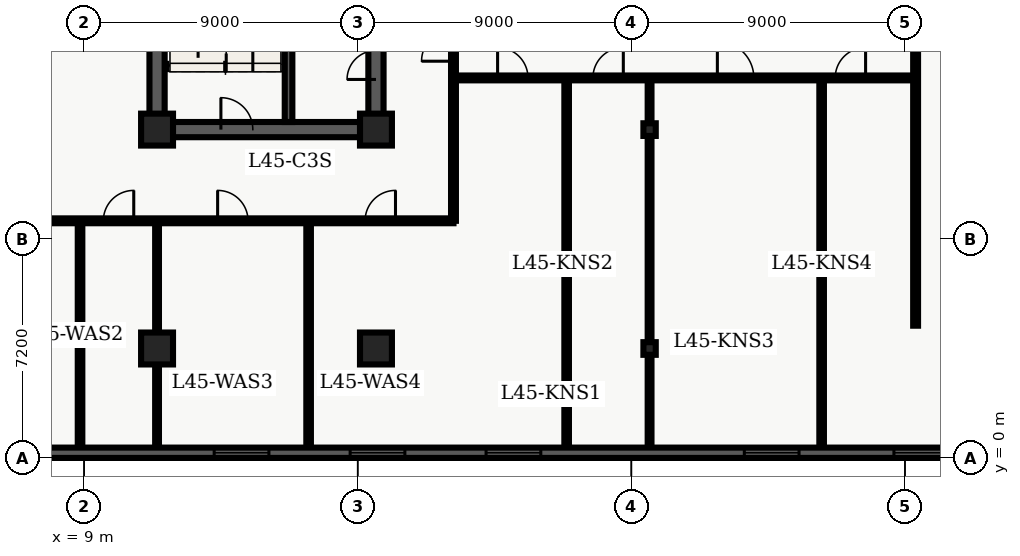
"""IFC4 building model, lengths in metres.
Left out: names, types, materials, properties, quantities, classifications, styles, units other than length and angle.
Written with IfcOpenShell. Run it as: python <this file> out.ifc"""

import sys

from ifc_helpers import new_model, entity, si_unit, converted_unit, direction, frame, origin_with_axes, origin_2d_with_axis, place, context, subcontext, project, spatial, polyline, rectangle, i_section, outline, extrude, element, fill, save


model = new_model("IFC4")
c1 = context("Model", 3, precision=1e-05, world=origin_with_axes(), true_north=direction((0.0, 1.0)))
c2 = subcontext(c1, "Body", "Model", "MODEL_VIEW")
j1 = project(units=[si_unit("LENGTHUNIT", "METRE"), converted_unit("PLANEANGLEUNIT", "DEGREE", entity("IfcPlaneAngleMeasure", 0.017), si_unit("PLANEANGLEUNIT", "RADIAN"), dimensions=[0, 0, 0, 0, 0, 0, 0])], contexts=[c1])
p1 = place(None, origin_with_axes())
s1 = spatial("IfcSite", under=j1, at=p1, CompositionType="ELEMENT")
p2 = place(p1, origin_with_axes())
s2 = spatial("IfcBuilding", under=s1, at=p2, CompositionType="ELEMENT")
p3 = place(p2, frame((0.0, 0.0, 183.6), z_axis=(0.0, 0.0, 1.0), x_axis=(1.0, 0.0, 0.0)))
s3 = spatial("IfcBuildingStorey", under=s2, at=p3, CompositionType="ELEMENT", Elevation=183.6)
p4 = place(p3, frame((11.4, 10.8, 0.0), z_axis=(0.0, 0.0, 1.0), x_axis=(0.0, 1.0, 0.0)))
e1 = element("IfcWall", 1, at=p4, inside=s3, PredefinedType="SHEAR", context=c2, shape_type="SweptSolid", body=[
    extrude(outline(polyline([(0.0, -0.25), (27.0, -0.25), (27.0, 0.25), (0.0, 0.25), (0.0, -0.25)])), origin_with_axes(), (0.0, 0.0, 1.0), 3.6),
])
p5 = place(p3, frame((11.4, 10.8, 0.0), z_axis=(0.0, 0.0, 1.0), x_axis=(1.0, 0.0, 0.0)))
e2 = element("IfcWall", 2, at=p5, inside=s3, PredefinedType="SHEAR", context=c2, shape_type="SweptSolid", body=[
    extrude(outline(polyline([(0.0, -0.25), (7.2, -0.25), (7.2, 0.25), (0.0, 0.25), (0.0, -0.25)])), origin_with_axes(), (0.0, 0.0, 1.0), 3.6),
])
p6 = place(p5, frame((2.625, 0.0, 0.0), z_axis=(0.0, 0.0, 1.0), x_axis=(1.0, 0.0, 0.0)))
e3 = element("IfcOpeningElement", 3, at=p6, cuts=e2, PredefinedType="OPENING", context=c2, shape_type="SweptSolid", body=[
    extrude(rectangle(XDim=1.05, YDim=0.52, at=origin_2d_with_axis()), origin_with_axes(), (0.0, 0.0, 1.0), 2.15),
])
p7 = place(p3, frame((18.6, 10.8, 0.0), z_axis=(0.0, 0.0, 1.0), x_axis=(0.0, 1.0, 0.0)))
e4 = element("IfcWall", 4, at=p7, inside=s3, PredefinedType="SHEAR", context=c2, shape_type="SweptSolid", body=[
    extrude(outline(polyline([(0.0, -0.25), (13.5, -0.25), (13.5, 0.25), (0.0, 0.25), (0.0, -0.25)])), origin_with_axes(), (0.0, 0.0, 1.0), 3.6),
])
p8 = place(p7, frame((11.125, 0.0, 0.0), z_axis=(0.0, 0.0, 1.0), x_axis=(1.0, 0.0, 0.0)))
e5 = element("IfcOpeningElement", 5, at=p8, cuts=e4, PredefinedType="OPENING", context=c2, shape_type="SweptSolid", body=[
    extrude(rectangle(XDim=1.05, YDim=0.52, at=origin_2d_with_axis()), origin_with_axes(), (0.0, 0.0, 1.0), 2.15),
])
p9 = place(p7, frame((2.125, 0.0, 0.0), z_axis=(0.0, 0.0, 1.0), x_axis=(1.0, 0.0, 0.0)))
e6 = element("IfcOpeningElement", 6, at=p9, cuts=e4, PredefinedType="OPENING", context=c2, shape_type="SweptSolid", body=[
    extrude(rectangle(XDim=0.95, YDim=0.52, at=origin_2d_with_axis()), origin_with_axes(), (0.0, 0.0, 1.0), 2.15),
])
p10 = place(p7, frame((6.275, 0.0, 0.0), z_axis=(0.0, 0.0, 1.0), x_axis=(1.0, 0.0, 0.0)))
e7 = element("IfcOpeningElement", 7, at=p10, cuts=e4, PredefinedType="OPENING", context=c2, shape_type="SweptSolid", body=[
    extrude(rectangle(XDim=0.95, YDim=0.52, at=origin_2d_with_axis()), origin_with_axes(), (0.0, 0.0, 1.0), 2.15),
])
p11 = place(p3, frame((15.725, 11.05, 0.0), z_axis=(0.0, 0.0, 1.0), x_axis=(0.0, 1.0, 0.0)))
e8 = element("IfcWall", 8, at=p11, inside=s3, PredefinedType="SHEAR", context=c2, shape_type="SweptSolid", body=[
    extrude(outline(polyline([(0.0, -0.125), (8.65, -0.125), (8.65, 0.125), (0.0, 0.125), (0.0, -0.125)])), origin_with_axes(), (0.0, 0.0, 1.0), 3.6),
])
for number, where, z_axis, x_axis in (
    (9, (11.4, 3.6, 0.0), (0.0, 0.0, 1.0), (1.0, 0.0, 0.0)),
    (10, (11.4, 10.8, 0.0), (0.0, 0.0, 1.0), (1.0, 0.0, 0.0)),
    (11, (18.6, 3.6, 0.0), (0.0, 0.0, 1.0), (1.0, 0.0, 0.0)),
    (12, (18.6, 10.8, 0.0), (0.0, 0.0, 1.0), (1.0, 0.0, 0.0)),
):
    element("IfcColumn", number, at=place(p3, frame(where, z_axis=z_axis, x_axis=x_axis)), inside=s3, PredefinedType="COLUMN", context=c2, shape_type="SweptSolid", body=[
        extrude(rectangle(XDim=1.05, YDim=1.05, at=origin_2d_with_axis()), origin_with_axes(), (0.0, 0.0, 1.0), 3.9),
    ])
for number, where, z_axis, x_axis in (
    (13, (27.6, 3.6, 0.0), (0.0, 0.0, 1.0), (1.0, 0.0, 0.0)),
    (14, (27.6, 10.8, 0.0), (0.0, 0.0, 1.0), (1.0, 0.0, 0.0)),
):
    element("IfcColumn", number, at=place(p3, frame(where, z_axis=z_axis, x_axis=x_axis)), inside=s3, PredefinedType="COLUMN", context=c2, shape_type="SweptSolid", body=[
        extrude(i_section(OverallWidth=0.406, OverallDepth=0.416, WebThickness=0.03, FlangeThickness=0.048, FilletRadius=0.022, at=origin_2d_with_axis()), origin_with_axes(), (0.0, 0.0, 1.0), 3.9),
    ])
p12 = place(p3, frame((2.6, 7.8, 0.0), z_axis=(0.0, 0.0, 1.0), x_axis=(1.0, 0.0, 0.0)))
e15 = element("IfcWall", 15, at=p12, inside=s3, PredefinedType="PARTITIONING", context=c2, shape_type="SweptSolid", body=[
    extrude(outline(polyline([(0.0, -0.08), (18.55, -0.08), (18.55, 0.08), (0.0, 0.08), (0.0, -0.08)])), origin_with_axes(), (0.0, 0.0, 1.0), 2.64),
])
p13 = place(p12, frame((2.569, 0.0, 0.0), z_axis=(0.0, 0.0, 1.0), x_axis=(1.0, 0.0, 0.0)))
e16 = element("IfcOpeningElement", 16, at=p13, cuts=e15, PredefinedType="OPENING", context=c2, shape_type="SweptSolid", body=[
    extrude(rectangle(XDim=1.0, YDim=0.18, at=origin_2d_with_axis()), origin_with_axes(), (0.0, 0.0, 1.0), 2.15),
])
p14 = place(p12, frame((7.534, 0.0, 0.0), z_axis=(0.0, 0.0, 1.0), x_axis=(1.0, 0.0, 0.0)))
e17 = element("IfcOpeningElement", 17, at=p14, cuts=e15, PredefinedType="OPENING", context=c2, shape_type="SweptSolid", body=[
    extrude(rectangle(XDim=1.0, YDim=0.18, at=origin_2d_with_axis()), origin_with_axes(), (0.0, 0.0, 1.0), 2.15),
])
p15 = place(p12, frame((11.293, 0.0, 0.0), z_axis=(0.0, 0.0, 1.0), x_axis=(1.0, 0.0, 0.0)))
e18 = element("IfcOpeningElement", 18, at=p15, cuts=e15, PredefinedType="OPENING", context=c2, shape_type="SweptSolid", body=[
    extrude(rectangle(XDim=1.0, YDim=0.18, at=origin_2d_with_axis()), origin_with_axes(), (0.0, 0.0, 1.0), 2.15),
])
p16 = place(p12, frame((16.142, 0.0, 0.0), z_axis=(0.0, 0.0, 1.0), x_axis=(1.0, 0.0, 0.0)))
e19 = element("IfcOpeningElement", 19, at=p16, cuts=e15, PredefinedType="OPENING", context=c2, shape_type="SweptSolid", body=[
    extrude(rectangle(XDim=1.0, YDim=0.18, at=origin_2d_with_axis()), origin_with_axes(), (0.0, 0.0, 1.0), 2.15),
])
p17 = place(p3, frame((21.15, 7.8, 0.0), z_axis=(0.0, 0.0, 1.0), x_axis=(0.0, 1.0, 0.0)))
e20 = element("IfcWall", 20, at=p17, inside=s3, PredefinedType="PARTITIONING", context=c2, shape_type="SweptSolid", body=[
    extrude(outline(polyline([(0.0, -0.08), (32.7, -0.08), (32.7, 0.08), (0.0, 0.08), (0.0, -0.08)])), origin_with_axes(), (0.0, 0.0, 1.0), 2.64),
])
p18 = place(p17, frame((16.456, 0.0, 0.0), z_axis=(0.0, 0.0, 1.0), x_axis=(1.0, 0.0, 0.0)))
e21 = element("IfcOpeningElement", 21, at=p18, cuts=e20, PredefinedType="OPENING", context=c2, shape_type="SweptSolid", body=[
    extrude(rectangle(XDim=1.0, YDim=0.18, at=origin_2d_with_axis()), origin_with_axes(), (0.0, 0.0, 1.0), 2.15),
])
p19 = place(p17, frame((22.009, 0.0, 0.0), z_axis=(0.0, 0.0, 1.0), x_axis=(1.0, 0.0, 0.0)))
e22 = element("IfcOpeningElement", 22, at=p19, cuts=e20, PredefinedType="OPENING", context=c2, shape_type="SweptSolid", body=[
    extrude(rectangle(XDim=1.0, YDim=0.18, at=origin_2d_with_axis()), origin_with_axes(), (0.0, 0.0, 1.0), 2.15),
])
p20 = place(p17, frame((28.803, 0.0, 0.0), z_axis=(0.0, 0.0, 1.0), x_axis=(1.0, 0.0, 0.0)))
e23 = element("IfcOpeningElement", 23, at=p20, cuts=e20, PredefinedType="OPENING", context=c2, shape_type="SweptSolid", body=[
    extrude(rectangle(XDim=1.0, YDim=0.18, at=origin_2d_with_axis()), origin_with_axes(), (0.0, 0.0, 1.0), 2.15),
])
p21 = place(p17, frame((5.775, 0.0, 0.0), z_axis=(0.0, 0.0, 1.0), x_axis=(1.0, 0.0, 0.0)))
e24 = element("IfcOpeningElement", 24, at=p21, cuts=e20, PredefinedType="OPENING", context=c2, shape_type="SweptSolid", body=[
    extrude(rectangle(XDim=1.05, YDim=0.18, at=origin_2d_with_axis()), origin_with_axes(), (0.0, 0.0, 1.0), 2.15),
])
p22 = place(p3, frame((8.867, 0.335, 0.0), z_axis=(0.0, 0.0, 1.0), x_axis=(0.0, 1.0, 0.0)))
e25 = element("IfcWall", 25, at=p22, inside=s3, PredefinedType="PARTITIONING", context=c2, shape_type="SweptSolid", body=[
    extrude(outline(polyline([(0.0, -0.075), (7.365, -0.075), (7.365, 0.075), (0.0, 0.075), (0.0, -0.075)])), origin_with_axes(), (0.0, 0.0, 1.0), 2.64),
])
p23 = place(p3, frame((11.4, 0.335, 0.0), z_axis=(0.0, 0.0, 1.0), x_axis=(0.0, 1.0, 0.0)))
e26 = element("IfcWall", 26, at=p23, inside=s3, PredefinedType="PARTITIONING", context=c2, shape_type="SweptSolid", body=[
    extrude(outline(polyline([(0.0, -0.062), (7.365, -0.062), (7.365, 0.062), (0.0, 0.062), (0.0, -0.062)])), origin_with_axes(), (0.0, 0.0, 1.0), 2.64),
])
p24 = place(p3, frame((16.385, 0.335, 0.0), z_axis=(0.0, 0.0, 1.0), x_axis=(0.0, 1.0, 0.0)))
e27 = element("IfcWall", 27, at=p24, inside=s3, PredefinedType="PARTITIONING", context=c2, shape_type="SweptSolid", body=[
    extrude(outline(polyline([(0.0, -0.075), (7.365, -0.075), (7.365, 0.075), (0.0, 0.075), (0.0, -0.075)])), origin_with_axes(), (0.0, 0.0, 1.0), 2.64),
])
p25 = place(p3, frame((21.15, 12.5, 0.0), z_axis=(0.0, 0.0, 1.0), x_axis=(1.0, 0.0, 0.0)))
e28 = element("IfcWall", 28, at=p25, inside=s3, PredefinedType="PARTITIONING", context=c2, shape_type="SweptSolid", body=[
    extrude(outline(polyline([(0.0, -0.08), (15.2, -0.08), (15.2, 0.08), (0.0, 0.08), (0.0, -0.08)])), origin_with_axes(), (0.0, 0.0, 1.0), 2.64),
])
p26 = place(p25, frame((1.951, 0.0, 0.0), z_axis=(0.0, 0.0, 1.0), x_axis=(1.0, 0.0, 0.0)))
e29 = element("IfcOpeningElement", 29, at=p26, cuts=e28, PredefinedType="OPENING", context=c2, shape_type="SweptSolid", body=[
    extrude(rectangle(XDim=1.0, YDim=0.18, at=origin_2d_with_axis()), origin_with_axes(), (0.0, 0.0, 1.0), 2.15),
])
p27 = place(p25, frame((5.086, 0.0, 0.0), z_axis=(0.0, 0.0, 1.0), x_axis=(1.0, 0.0, 0.0)))
e30 = element("IfcOpeningElement", 30, at=p27, cuts=e28, PredefinedType="OPENING", context=c2, shape_type="SweptSolid", body=[
    extrude(rectangle(XDim=1.0, YDim=0.18, at=origin_2d_with_axis()), origin_with_axes(), (0.0, 0.0, 1.0), 2.15),
])
p28 = place(p25, frame((9.28, 0.0, 0.0), z_axis=(0.0, 0.0, 1.0), x_axis=(1.0, 0.0, 0.0)))
e31 = element("IfcOpeningElement", 31, at=p28, cuts=e28, PredefinedType="OPENING", context=c2, shape_type="SweptSolid", body=[
    extrude(rectangle(XDim=1.2, YDim=0.18, at=origin_2d_with_axis()), origin_with_axes(), (0.0, 0.0, 1.0), 2.2),
])
p29 = place(p25, frame((13.055, 0.0, 0.0), z_axis=(0.0, 0.0, 1.0), x_axis=(1.0, 0.0, 0.0)))
e32 = element("IfcOpeningElement", 32, at=p29, cuts=e28, PredefinedType="OPENING", context=c2, shape_type="SweptSolid", body=[
    extrude(rectangle(XDim=1.0, YDim=0.18, at=origin_2d_with_axis()), origin_with_axes(), (0.0, 0.0, 1.0), 2.15),
])
p30 = place(p3, frame((36.35, 4.35, 0.0), z_axis=(0.0, 0.0, 1.0), x_axis=(0.0, 1.0, 0.0)))
e33 = element("IfcWall", 33, at=p30, inside=s3, PredefinedType="PARTITIONING", context=c2, shape_type="SweptSolid", body=[
    extrude(outline(polyline([(0.0, -0.08), (16.95, -0.08), (16.95, 0.08), (0.0, 0.08), (0.0, -0.08)])), origin_with_axes(), (0.0, 0.0, 1.0), 2.64),
])
p31 = place(p3, frame((24.872, 0.335, 0.0), z_axis=(0.0, 0.0, 1.0), x_axis=(0.0, 1.0, 0.0)))
e34 = element("IfcWall", 34, at=p31, inside=s3, PredefinedType="PARTITIONING", context=c2, shape_type="SweptSolid", body=[
    extrude(outline(polyline([(0.0, -0.075), (12.045, -0.075), (12.045, 0.075), (0.0, 0.075), (0.0, -0.075)])), origin_with_axes(), (0.0, 0.0, 1.0), 2.64),
])
p32 = place(p3, frame((27.6, 0.335, 0.0), z_axis=(0.0, 0.0, 1.0), x_axis=(0.0, 1.0, 0.0)))
e35 = element("IfcWall", 35, at=p32, inside=s3, PredefinedType="PARTITIONING", context=c2, shape_type="SweptSolid", body=[
    extrude(outline(polyline([(0.0, -0.062), (12.045, -0.062), (12.045, 0.062), (0.0, 0.062), (0.0, -0.062)])), origin_with_axes(), (0.0, 0.0, 1.0), 2.64),
])
p33 = place(p3, frame((33.259, 0.335, 0.0), z_axis=(0.0, 0.0, 1.0), x_axis=(0.0, 1.0, 0.0)))
e36 = element("IfcWall", 36, at=p33, inside=s3, PredefinedType="PARTITIONING", context=c2, shape_type="SweptSolid", body=[
    extrude(outline(polyline([(0.0, -0.075), (12.045, -0.075), (12.045, 0.075), (0.0, 0.075), (0.0, -0.075)])), origin_with_axes(), (0.0, 0.0, 1.0), 2.64),
])
p34 = place(p3, frame((57.26, 0.17, 0.0), z_axis=(0.0, 0.0, 1.0), x_axis=(-1.0, 0.0, 0.0)))
e37 = element("IfcWall", 37, at=p34, inside=s3, PredefinedType="SOLIDWALL", context=c2, shape_type="SweptSolid", body=[
    extrude(outline(polyline([(0.0, -0.17), (54.86, -0.17), (54.86, 0.17), (0.0, 0.17), (0.0, -0.17)])), origin_with_axes(), (0.0, 0.0, 1.0), 3.6),
])
p35 = place(p34, frame((2.836, 0.0, 0.45), z_axis=(0.0, 0.0, 1.0), x_axis=(1.0, 0.0, 0.0)))
e38 = element("IfcOpeningElement", 38, at=p35, cuts=e37, PredefinedType="OPENING", context=c2, shape_type="SweptSolid", body=[
    extrude(rectangle(XDim=1.8, YDim=0.36, at=origin_2d_with_axis()), origin_with_axes(), (0.0, 0.0, 1.0), 2.1),
])
p36 = place(p34, frame((7.307, 0.0, 0.45), z_axis=(0.0, 0.0, 1.0), x_axis=(1.0, 0.0, 0.0)))
e39 = element("IfcOpeningElement", 39, at=p36, cuts=e37, PredefinedType="OPENING", context=c2, shape_type="SweptSolid", body=[
    extrude(rectangle(XDim=1.8, YDim=0.36, at=origin_2d_with_axis()), origin_with_axes(), (0.0, 0.0, 1.0), 2.1),
])
p37 = place(p34, frame((11.779, 0.0, 0.45), z_axis=(0.0, 0.0, 1.0), x_axis=(1.0, 0.0, 0.0)))
e40 = element("IfcOpeningElement", 40, at=p37, cuts=e37, PredefinedType="OPENING", context=c2, shape_type="SweptSolid", body=[
    extrude(rectangle(XDim=1.8, YDim=0.36, at=origin_2d_with_axis()), origin_with_axes(), (0.0, 0.0, 1.0), 2.1),
])
p38 = place(p34, frame((16.251, 0.0, 0.45), z_axis=(0.0, 0.0, 1.0), x_axis=(1.0, 0.0, 0.0)))
e41 = element("IfcOpeningElement", 41, at=p38, cuts=e37, PredefinedType="OPENING", context=c2, shape_type="SweptSolid", body=[
    extrude(rectangle(XDim=1.8, YDim=0.36, at=origin_2d_with_axis()), origin_with_axes(), (0.0, 0.0, 1.0), 2.1),
])
p39 = place(p34, frame((20.723, 0.0, 0.45), z_axis=(0.0, 0.0, 1.0), x_axis=(1.0, 0.0, 0.0)))
e42 = element("IfcOpeningElement", 42, at=p39, cuts=e37, PredefinedType="OPENING", context=c2, shape_type="SweptSolid", body=[
    extrude(rectangle(XDim=1.8, YDim=0.36, at=origin_2d_with_axis()), origin_with_axes(), (0.0, 0.0, 1.0), 2.1),
])
p40 = place(p34, frame((25.644, 0.0, 0.45), z_axis=(0.0, 0.0, 1.0), x_axis=(1.0, 0.0, 0.0)))
e43 = element("IfcOpeningElement", 43, at=p40, cuts=e37, PredefinedType="OPENING", context=c2, shape_type="SweptSolid", body=[
    extrude(rectangle(XDim=1.8, YDim=0.36, at=origin_2d_with_axis()), origin_with_axes(), (0.0, 0.0, 1.0), 2.1),
])
p41 = place(p34, frame((34.138, 0.0, 0.45), z_axis=(0.0, 0.0, 1.0), x_axis=(1.0, 0.0, 0.0)))
e44 = element("IfcOpeningElement", 44, at=p41, cuts=e37, PredefinedType="OPENING", context=c2, shape_type="SweptSolid", body=[
    extrude(rectangle(XDim=1.8, YDim=0.36, at=origin_2d_with_axis()), origin_with_axes(), (0.0, 0.0, 1.0), 2.1),
])
p42 = place(p34, frame((38.609, 0.0, 0.45), z_axis=(0.0, 0.0, 1.0), x_axis=(1.0, 0.0, 0.0)))
e45 = element("IfcOpeningElement", 45, at=p42, cuts=e37, PredefinedType="OPENING", context=c2, shape_type="SweptSolid", body=[
    extrude(rectangle(XDim=1.8, YDim=0.36, at=origin_2d_with_axis()), origin_with_axes(), (0.0, 0.0, 1.0), 2.1),
])
p43 = place(p34, frame((43.081, 0.0, 0.45), z_axis=(0.0, 0.0, 1.0), x_axis=(1.0, 0.0, 0.0)))
e46 = element("IfcOpeningElement", 46, at=p43, cuts=e37, PredefinedType="OPENING", context=c2, shape_type="SweptSolid", body=[
    extrude(rectangle(XDim=1.8, YDim=0.36, at=origin_2d_with_axis()), origin_with_axes(), (0.0, 0.0, 1.0), 2.1),
])
p44 = place(p34, frame((52.024, 0.0, 0.45), z_axis=(0.0, 0.0, 1.0), x_axis=(1.0, 0.0, 0.0)))
e47 = element("IfcOpeningElement", 47, at=p44, cuts=e37, PredefinedType="OPENING", context=c2, shape_type="SweptSolid", body=[
    extrude(rectangle(XDim=1.8, YDim=0.36, at=origin_2d_with_axis()), origin_with_axes(), (0.0, 0.0, 1.0), 2.1),
])
p45 = place(p5, frame((2.625, 0.0, 0.0), z_axis=(0.0, 0.0, 1.0), x_axis=(1.0, 0.0, 0.0)))
e48 = element("IfcDoor", 48, at=p45, inside=s3, OperationType="SINGLE_SWING_LEFT", PredefinedType="DOOR", context=c2, shape_type="SweptSolid", body=[
    extrude(rectangle(XDim=1.05, YDim=0.09, at=origin_2d_with_axis()), origin_with_axes(), (0.0, 0.0, 1.0), 2.15),
])
fill(e3, e48)
p46 = place(p7, frame((2.125, 0.0, 0.0), z_axis=(0.0, 0.0, 1.0), x_axis=(1.0, 0.0, 0.0)))
e49 = element("IfcDoor", 49, at=p46, inside=s3, OperationType="SINGLE_SWING_LEFT", PredefinedType="DOOR", context=c2, shape_type="SweptSolid", body=[
    extrude(rectangle(XDim=0.95, YDim=0.09, at=origin_2d_with_axis()), origin_with_axes(), (0.0, 0.0, 1.0), 2.15),
])
fill(e6, e49)
p47 = place(p12, frame((7.534, 0.0, 0.0), z_axis=(0.0, 0.0, 1.0), x_axis=(1.0, 0.0, 0.0)))
e50 = element("IfcDoor", 50, at=p47, inside=s3, OperationType="SINGLE_SWING_RIGHT", PredefinedType="DOOR", context=c2, shape_type="SweptSolid", body=[
    extrude(rectangle(XDim=1.0, YDim=0.09, at=origin_2d_with_axis()), origin_with_axes(), (0.0, 0.0, 1.0), 2.15),
])
fill(e17, e50)
p48 = place(p12, frame((11.293, 0.0, 0.0), z_axis=(0.0, 0.0, 1.0), x_axis=(1.0, 0.0, 0.0)))
e51 = element("IfcDoor", 51, at=p48, inside=s3, OperationType="SINGLE_SWING_LEFT", PredefinedType="DOOR", context=c2, shape_type="SweptSolid", body=[
    extrude(rectangle(XDim=1.0, YDim=0.09, at=origin_2d_with_axis()), origin_with_axes(), (0.0, 0.0, 1.0), 2.15),
])
fill(e18, e51)
p49 = place(p12, frame((16.142, 0.0, 0.0), z_axis=(0.0, 0.0, 1.0), x_axis=(1.0, 0.0, 0.0)))
e52 = element("IfcDoor", 52, at=p49, inside=s3, OperationType="SINGLE_SWING_RIGHT", PredefinedType="DOOR", context=c2, shape_type="SweptSolid", body=[
    extrude(rectangle(XDim=1.0, YDim=0.09, at=origin_2d_with_axis()), origin_with_axes(), (0.0, 0.0, 1.0), 2.15),
])
fill(e19, e52)
p50 = place(p17, frame((5.775, 0.0, 0.0), z_axis=(0.0, 0.0, 1.0), x_axis=(1.0, 0.0, 0.0)))
e53 = element("IfcDoor", 53, at=p50, inside=s3, OperationType="SINGLE_SWING_LEFT", PredefinedType="DOOR", context=c2, shape_type="SweptSolid", body=[
    extrude(rectangle(XDim=1.05, YDim=0.09, at=origin_2d_with_axis()), origin_with_axes(), (0.0, 0.0, 1.0), 2.15),
])
fill(e24, e53)
p51 = place(p25, frame((1.951, 0.0, 0.0), z_axis=(0.0, 0.0, 1.0), x_axis=(1.0, 0.0, 0.0)))
e54 = element("IfcDoor", 54, at=p51, inside=s3, OperationType="SINGLE_SWING_LEFT", PredefinedType="DOOR", context=c2, shape_type="SweptSolid", body=[
    extrude(rectangle(XDim=1.0, YDim=0.09, at=origin_2d_with_axis()), origin_with_axes(), (0.0, 0.0, 1.0), 2.15),
])
fill(e29, e54)
p52 = place(p25, frame((5.086, 0.0, 0.0), z_axis=(0.0, 0.0, 1.0), x_axis=(1.0, 0.0, 0.0)))
e55 = element("IfcDoor", 55, at=p52, inside=s3, OperationType="SINGLE_SWING_RIGHT", PredefinedType="DOOR", context=c2, shape_type="SweptSolid", body=[
    extrude(rectangle(XDim=1.0, YDim=0.09, at=origin_2d_with_axis()), origin_with_axes(), (0.0, 0.0, 1.0), 2.15),
])
fill(e30, e55)
p53 = place(p25, frame((9.28, 0.0, 0.0), z_axis=(0.0, 0.0, 1.0), x_axis=(1.0, 0.0, 0.0)))
e56 = element("IfcDoor", 56, at=p53, inside=s3, OperationType="SINGLE_SWING_LEFT", PredefinedType="DOOR", context=c2, shape_type="SweptSolid", body=[
    extrude(rectangle(XDim=1.2, YDim=0.09, at=origin_2d_with_axis()), origin_with_axes(), (0.0, 0.0, 1.0), 2.2),
])
fill(e31, e56)
p54 = place(p25, frame((13.055, 0.0, 0.0), z_axis=(0.0, 0.0, 1.0), x_axis=(1.0, 0.0, 0.0)))
e57 = element("IfcDoor", 57, at=p54, inside=s3, OperationType="SINGLE_SWING_RIGHT", PredefinedType="DOOR", context=c2, shape_type="SweptSolid", body=[
    extrude(rectangle(XDim=1.0, YDim=0.09, at=origin_2d_with_axis()), origin_with_axes(), (0.0, 0.0, 1.0), 2.15),
])
fill(e32, e57)
p55 = place(p34, frame((20.723, 0.0, 0.45), z_axis=(0.0, 0.0, 1.0), x_axis=(1.0, 0.0, 0.0)))
e58 = element("IfcWindow", 58, at=p55, inside=s3, PredefinedType="WINDOW", context=c2, shape_type="SweptSolid", body=[
    extrude(rectangle(XDim=1.8, YDim=0.09, at=origin_2d_with_axis()), origin_with_axes(), (0.0, 0.0, 1.0), 2.1),
])
fill(e42, e58)
p56 = place(p34, frame((25.644, 0.0, 0.45), z_axis=(0.0, 0.0, 1.0), x_axis=(1.0, 0.0, 0.0)))
e59 = element("IfcWindow", 59, at=p56, inside=s3, PredefinedType="WINDOW", context=c2, shape_type="SweptSolid", body=[
    extrude(rectangle(XDim=1.8, YDim=0.09, at=origin_2d_with_axis()), origin_with_axes(), (0.0, 0.0, 1.0), 2.1),
])
fill(e43, e59)
p57 = place(p34, frame((34.138, 0.0, 0.45), z_axis=(0.0, 0.0, 1.0), x_axis=(1.0, 0.0, 0.0)))
e60 = element("IfcWindow", 60, at=p57, inside=s3, PredefinedType="WINDOW", context=c2, shape_type="SweptSolid", body=[
    extrude(rectangle(XDim=1.8, YDim=0.09, at=origin_2d_with_axis()), origin_with_axes(), (0.0, 0.0, 1.0), 2.1),
])
fill(e44, e60)
p58 = place(p34, frame((38.609, 0.0, 0.45), z_axis=(0.0, 0.0, 1.0), x_axis=(1.0, 0.0, 0.0)))
e61 = element("IfcWindow", 61, at=p58, inside=s3, PredefinedType="WINDOW", context=c2, shape_type="SweptSolid", body=[
    extrude(rectangle(XDim=1.8, YDim=0.09, at=origin_2d_with_axis()), origin_with_axes(), (0.0, 0.0, 1.0), 2.1),
])
fill(e45, e61)
p59 = place(p34, frame((43.081, 0.0, 0.45), z_axis=(0.0, 0.0, 1.0), x_axis=(1.0, 0.0, 0.0)))
e62 = element("IfcWindow", 62, at=p59, inside=s3, PredefinedType="WINDOW", context=c2, shape_type="SweptSolid", body=[
    extrude(rectangle(XDim=1.8, YDim=0.09, at=origin_2d_with_axis()), origin_with_axes(), (0.0, 0.0, 1.0), 2.1),
])
fill(e46, e62)
save(model, sys.argv[1])
